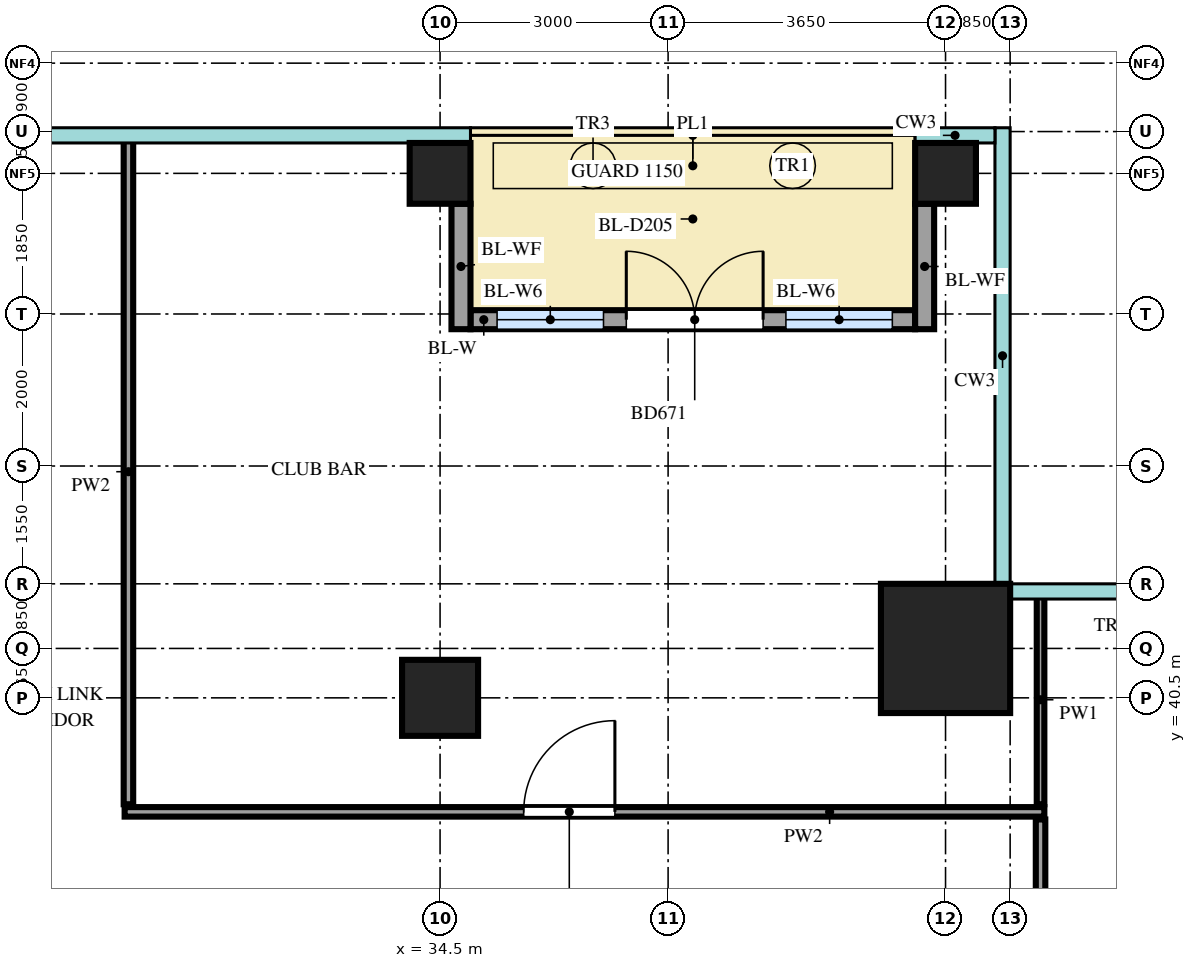
"""IFC4 building model, lengths in metres.
Left out: names, types, materials, properties, quantities, classifications, styles, units other than length and angle.
Written with IfcOpenShell. Run it as: python <this file> out.ifc"""

import sys

from ifc_helpers import new_model, si_unit, direction, frame, frame_2d, origin, origin_2d, place, context, subcontext, project, spatial, rectangle, extrude, source, transform, mapped, element, fill, save


model = new_model("IFC4")
c1 = context("Model", 3, precision=1e-05, world=origin(), true_north=direction((0.0, 1.0)))
c2 = subcontext(c1, "Body", "Model", "MODEL_VIEW")
j1 = project(units=[si_unit("LENGTHUNIT", "METRE"), si_unit("PLANEANGLEUNIT", "RADIAN")], contexts=[c1])
p1 = place(None, origin())
s1 = spatial("IfcSite", under=j1, at=p1, CompositionType="ELEMENT")
p2 = place(p1, origin())
s2 = spatial("IfcBuilding", under=s1, at=p2, CompositionType="ELEMENT")
p3 = place(p2, frame((0.0, 0.0, 298.2)))
s3 = spatial("IfcBuildingStorey", under=s2, at=p3, CompositionType="ELEMENT", Elevation=298.2)
m1 = source(origin(), c2, "Body", "SweptSolid", [
    extrude(rectangle(XDim=1.7, YDim=1.7, at=origin_2d()), origin(), (0.0, 0.0, 1.0), 3.75),
])
p4 = place(p3, frame((41.15, 41.15, 0.0), z_axis=(0.0, 0.0, 1.0), x_axis=(1.0, 0.0, 0.0)))
e1 = element("IfcColumn", 1, at=p4, inside=s3, PredefinedType="COLUMN", context=c2, shape_type="MappedRepresentation", body=[
    mapped(m1, transform((0.0, 0.0, 0.0))),
])
m2 = source(origin(), c2, "Body", "SweptSolid", [
    extrude(rectangle(XDim=0.8, YDim=0.8, at=origin_2d()), origin(), (0.0, 0.0, 1.0), 3.75),
])
for number, where, z_axis, x_axis in (
    (2, (34.5, 47.4, 0.0), (0.0, 0.0, 1.0), (1.0, 0.0, 0.0)),
    (3, (41.15, 47.4, 0.0), (0.0, 0.0, 1.0), (1.0, 0.0, 0.0)),
):
    element("IfcColumn", number, at=place(p3, frame(where, z_axis=z_axis, x_axis=x_axis)), inside=s3, PredefinedType="COLUMN", context=c2, shape_type="MappedRepresentation", body=[
        mapped(m2, transform((0.0, 0.0, 0.0))),
    ])
m3 = source(origin(), c2, "Body", "SweptSolid", [
    extrude(rectangle(XDim=1.0, YDim=1.0, at=origin_2d()), origin(), (0.0, 0.0, 1.0), 3.75),
])
p5 = place(p3, frame((34.5, 40.5, 0.0), z_axis=(0.0, 0.0, 1.0), x_axis=(1.0, 0.0, 0.0)))
e4 = element("IfcColumn", 4, at=p5, inside=s3, PredefinedType="COLUMN", context=c2, shape_type="MappedRepresentation", body=[
    mapped(m3, transform((0.0, 0.0, 0.0))),
])
m4 = source(origin(), c2, "Body", "SweptSolid", [
    extrude(rectangle(XDim=5.85, YDim=0.25, at=frame_2d((2.925, 0.0))), origin(), (0.0, 0.0, 1.0), 3.75),
])
p6 = place(p3, frame((34.9, 45.475, 0.0), z_axis=(0.0, 0.0, 1.0), x_axis=(1.0, 0.0, 0.0)))
e5 = element("IfcWall", 5, at=p6, inside=s3, PredefinedType="SOLIDWALL", context=c2, shape_type="MappedRepresentation", body=[
    mapped(m4, transform((0.0, 0.0, 0.0))),
])
m5 = source(origin(), c2, "Body", "SweptSolid", [
    extrude(rectangle(XDim=1.4, YDim=2.4, at=frame_2d((0.7, 1.2))), frame((0.0, 0.135, 0.0), z_axis=(0.0, -1.0, 0.0), x_axis=(1.0, 0.0, 0.0)), (0.0, 0.0, 1.0), 0.27),
])
p7 = place(p6, frame((0.35, 0.0, 0.0)))
e6 = element("IfcOpeningElement", 6, at=p7, cuts=e5, PredefinedType="OPENING", context=c2, shape_type="MappedRepresentation", body=[
    mapped(m5, transform((0.0, 0.0, 0.0))),
])
p8 = place(p6, frame((4.15, 0.0, 0.0)))
e7 = element("IfcOpeningElement", 7, at=p8, cuts=e5, PredefinedType="OPENING", context=c2, shape_type="MappedRepresentation", body=[
    mapped(m5, transform((0.0, 0.0, 0.0))),
])
m6 = source(origin(), c2, "Body", "SweptSolid", [
    extrude(rectangle(XDim=1.8, YDim=2.4, at=frame_2d((0.9, 1.2))), frame((0.0, 0.135, 0.0), z_axis=(0.0, -1.0, 0.0), x_axis=(1.0, 0.0, 0.0)), (0.0, 0.0, 1.0), 0.27),
])
p9 = place(p6, frame((2.05, 0.0, 0.0)))
e8 = element("IfcOpeningElement", 8, at=p9, cuts=e5, PredefinedType="OPENING", context=c2, shape_type="MappedRepresentation", body=[
    mapped(m6, transform((0.0, 0.0, 0.0))),
])
m7 = source(origin(), c2, "Body", "SweptSolid", [
    extrude(rectangle(XDim=1.65, YDim=0.25, at=frame_2d((0.825, 0.0))), origin(), (0.0, 0.0, 1.0), 3.45),
])
for number, where, z_axis, x_axis in (
    (9, (34.775, 47.0, 0.0), (0.0, 0.0, 1.0), (0.0, -1.0, 0.0)),
    (10, (40.875, 47.0, 0.0), (0.0, 0.0, 1.0), (0.0, -1.0, 0.0)),
):
    element("IfcWall", number, at=place(p3, frame(where, z_axis=z_axis, x_axis=x_axis)), inside=s3, PredefinedType="SOLIDWALL", context=c2, shape_type="MappedRepresentation", body=[
        mapped(m7, transform((0.0, 0.0, 0.0))),
    ])
m8 = source(origin(), c2, "Body", "SweptSolid", [
    extrude(rectangle(XDim=23.8, YDim=0.125, at=frame_2d((11.9, 0.0))), origin(), (0.0, 0.0, 1.0), 3.8),
])
p10 = place(p3, frame((42.4, 15.1, 0.0), z_axis=(0.0, 0.0, 1.0), x_axis=(0.0, 1.0, 0.0)))
e11 = element("IfcWall", 11, at=p10, inside=s3, PredefinedType="PARTITIONING", context=c2, shape_type="MappedRepresentation", body=[
    mapped(m8, transform((0.0, 0.0, 0.0))),
])
m9 = source(origin(), c2, "Body", "SweptSolid", [
    extrude(rectangle(XDim=0.9, YDim=2.1, at=frame_2d((0.45, 1.05))), frame((0.0, 0.073, 0.0), z_axis=(0.0, -1.0, 0.0), x_axis=(1.0, 0.0, 0.0)), (0.0, 0.0, 1.0), 0.145),
])
p11 = place(p10, frame((1.55, 0.0, 0.0)))
e12 = element("IfcOpeningElement", 12, at=p11, cuts=e11, PredefinedType="OPENING", context=c2, shape_type="MappedRepresentation", body=[
    mapped(m9, transform((0.0, 0.0, 0.0))),
])
p12 = place(p10, frame((5.55, 0.0, 0.0)))
e13 = element("IfcOpeningElement", 13, at=p12, cuts=e11, PredefinedType="OPENING", context=c2, shape_type="MappedRepresentation", body=[
    mapped(m9, transform((0.0, 0.0, 0.0))),
])
p13 = place(p10, frame((9.05, 0.0, 0.0)))
e14 = element("IfcOpeningElement", 14, at=p13, cuts=e11, PredefinedType="OPENING", context=c2, shape_type="MappedRepresentation", body=[
    mapped(m9, transform((0.0, 0.0, 0.0))),
])
m10 = source(origin(), c2, "Body", "SweptSolid", [
    extrude(rectangle(XDim=1.0, YDim=2.1, at=frame_2d((0.5, 1.05))), frame((0.0, 0.073, 0.0), z_axis=(0.0, -1.0, 0.0), x_axis=(1.0, 0.0, 0.0)), (0.0, 0.0, 1.0), 0.145),
])
p14 = place(p10, frame((12.4, 0.0, 0.0)))
e15 = element("IfcOpeningElement", 15, at=p14, cuts=e11, PredefinedType="OPENING", context=c2, shape_type="MappedRepresentation", body=[
    mapped(m10, transform((0.0, 0.0, 0.0))),
])
p15 = place(p10, frame((16.6, 0.0, 0.0)))
e16 = element("IfcOpeningElement", 16, at=p15, cuts=e11, PredefinedType="OPENING", context=c2, shape_type="MappedRepresentation", body=[
    mapped(m9, transform((0.0, 0.0, 0.0))),
])
p16 = place(p10, frame((21.05, 0.0, 0.0)))
e17 = element("IfcOpeningElement", 17, at=p16, cuts=e11, PredefinedType="OPENING", context=c2, shape_type="MappedRepresentation", body=[
    mapped(m9, transform((0.0, 0.0, 0.0))),
])
m11 = source(origin(), c2, "Body", "SweptSolid", [
    extrude(rectangle(XDim=12.1, YDim=0.125, at=frame_2d((6.05, 0.0))), origin(), (0.0, 0.0, 1.0), 3.8),
])
p17 = place(p3, frame((30.35, 39.0, 0.0), z_axis=(0.0, 0.0, 1.0), x_axis=(1.0, 0.0, 0.0)))
e18 = element("IfcWall", 18, at=p17, inside=s3, PredefinedType="PARTITIONING", context=c2, shape_type="MappedRepresentation", body=[
    mapped(m11, transform((0.0, 0.0, 0.0))),
])
m12 = source(origin(), c2, "Body", "SweptSolid", [
    extrude(rectangle(XDim=1.2, YDim=2.1, at=frame_2d((0.6, 1.05))), frame((0.0, 0.073, 0.0), z_axis=(0.0, -1.0, 0.0), x_axis=(1.0, 0.0, 0.0)), (0.0, 0.0, 1.0), 0.145),
])
p18 = place(p17, frame((5.25, 0.0, 0.0)))
e19 = element("IfcOpeningElement", 19, at=p18, cuts=e18, PredefinedType="OPENING", context=c2, shape_type="MappedRepresentation", body=[
    mapped(m12, transform((0.0, 0.0, 0.0))),
])
m13 = source(origin(), c2, "Body", "SweptSolid", [
    extrude(rectangle(XDim=8.75, YDim=0.125, at=frame_2d((4.375, 0.0))), origin(), (0.0, 0.0, 1.0), 3.8),
])
p19 = place(p3, frame((30.4, 39.1, 0.0), z_axis=(0.0, 0.0, 1.0), x_axis=(0.0, 1.0, 0.0)))
e20 = element("IfcWall", 20, at=p19, inside=s3, PredefinedType="PARTITIONING", context=c2, shape_type="MappedRepresentation", body=[
    mapped(m13, transform((0.0, 0.0, 0.0))),
])
m14 = source(origin(), c2, "Body", "SweptSolid", [
    extrude(rectangle(XDim=2.75, YDim=0.1, at=frame_2d((1.375, 0.0))), origin(), (0.0, 0.0, 1.0), 3.8),
])
p20 = place(p3, frame((42.4, 39.1, 0.0), z_axis=(0.0, 0.0, 1.0), x_axis=(0.0, 1.0, 0.0)))
e21 = element("IfcWall", 21, at=p20, inside=s3, PredefinedType="PARTITIONING", context=c2, shape_type="MappedRepresentation", body=[
    mapped(m14, transform((0.0, 0.0, 0.0))),
])
m15 = source(origin(), c2, "Body", "SweptSolid", [
    extrude(rectangle(XDim=1.4, YDim=2.4, at=frame_2d((0.7, 1.2))), frame((0.0, 0.03, 0.0), z_axis=(0.0, -1.0, 0.0), x_axis=(1.0, 0.0, 0.0)), (0.0, 0.0, 1.0), 0.06),
])
p21 = place(p7, origin())
e22 = element("IfcWindow", 22, at=p21, inside=s3, PartitioningType="SINGLE_PANEL", PredefinedType="WINDOW", context=c2, shape_type="MappedRepresentation", body=[
    mapped(m15, transform((0.0, 0.0, 0.0))),
])
fill(e6, e22)
p22 = place(p8, origin())
e23 = element("IfcWindow", 23, at=p22, inside=s3, PartitioningType="SINGLE_PANEL", PredefinedType="WINDOW", context=c2, shape_type="MappedRepresentation", body=[
    mapped(m15, transform((0.0, 0.0, 0.0))),
])
fill(e7, e23)
m16 = source(origin(), c2, "Body", "SweptSolid", [
    extrude(rectangle(XDim=1.8, YDim=2.4, at=frame_2d((0.9, 1.2))), frame((0.0, 0.025, 0.0), z_axis=(0.0, -1.0, 0.0), x_axis=(1.0, 0.0, 0.0)), (0.0, 0.0, 1.0), 0.05),
])
p23 = place(p9, origin())
e24 = element("IfcDoor", 24, at=p23, inside=s3, OperationType="DOUBLE_DOOR_DOUBLE_SWING", PredefinedType="DOOR", context=c2, shape_type="MappedRepresentation", body=[
    mapped(m16, transform((0.0, 0.0, 0.0))),
])
fill(e8, e24)
m17 = source(origin(), c2, "Body", "SweptSolid", [
    extrude(rectangle(XDim=1.2, YDim=2.1, at=frame_2d((0.6, 1.05))), frame((0.0, 0.025, 0.0), z_axis=(0.0, -1.0, 0.0), x_axis=(1.0, 0.0, 0.0)), (0.0, 0.0, 1.0), 0.05),
])
p24 = place(p18, origin())
e25 = element("IfcDoor", 25, at=p24, inside=s3, OperationType="SINGLE_SWING_LEFT", PredefinedType="DOOR", context=c2, shape_type="MappedRepresentation", body=[
    mapped(m17, transform((0.0, 0.0, 0.0))),
])
fill(e19, e25)
save(model, sys.argv[1])
